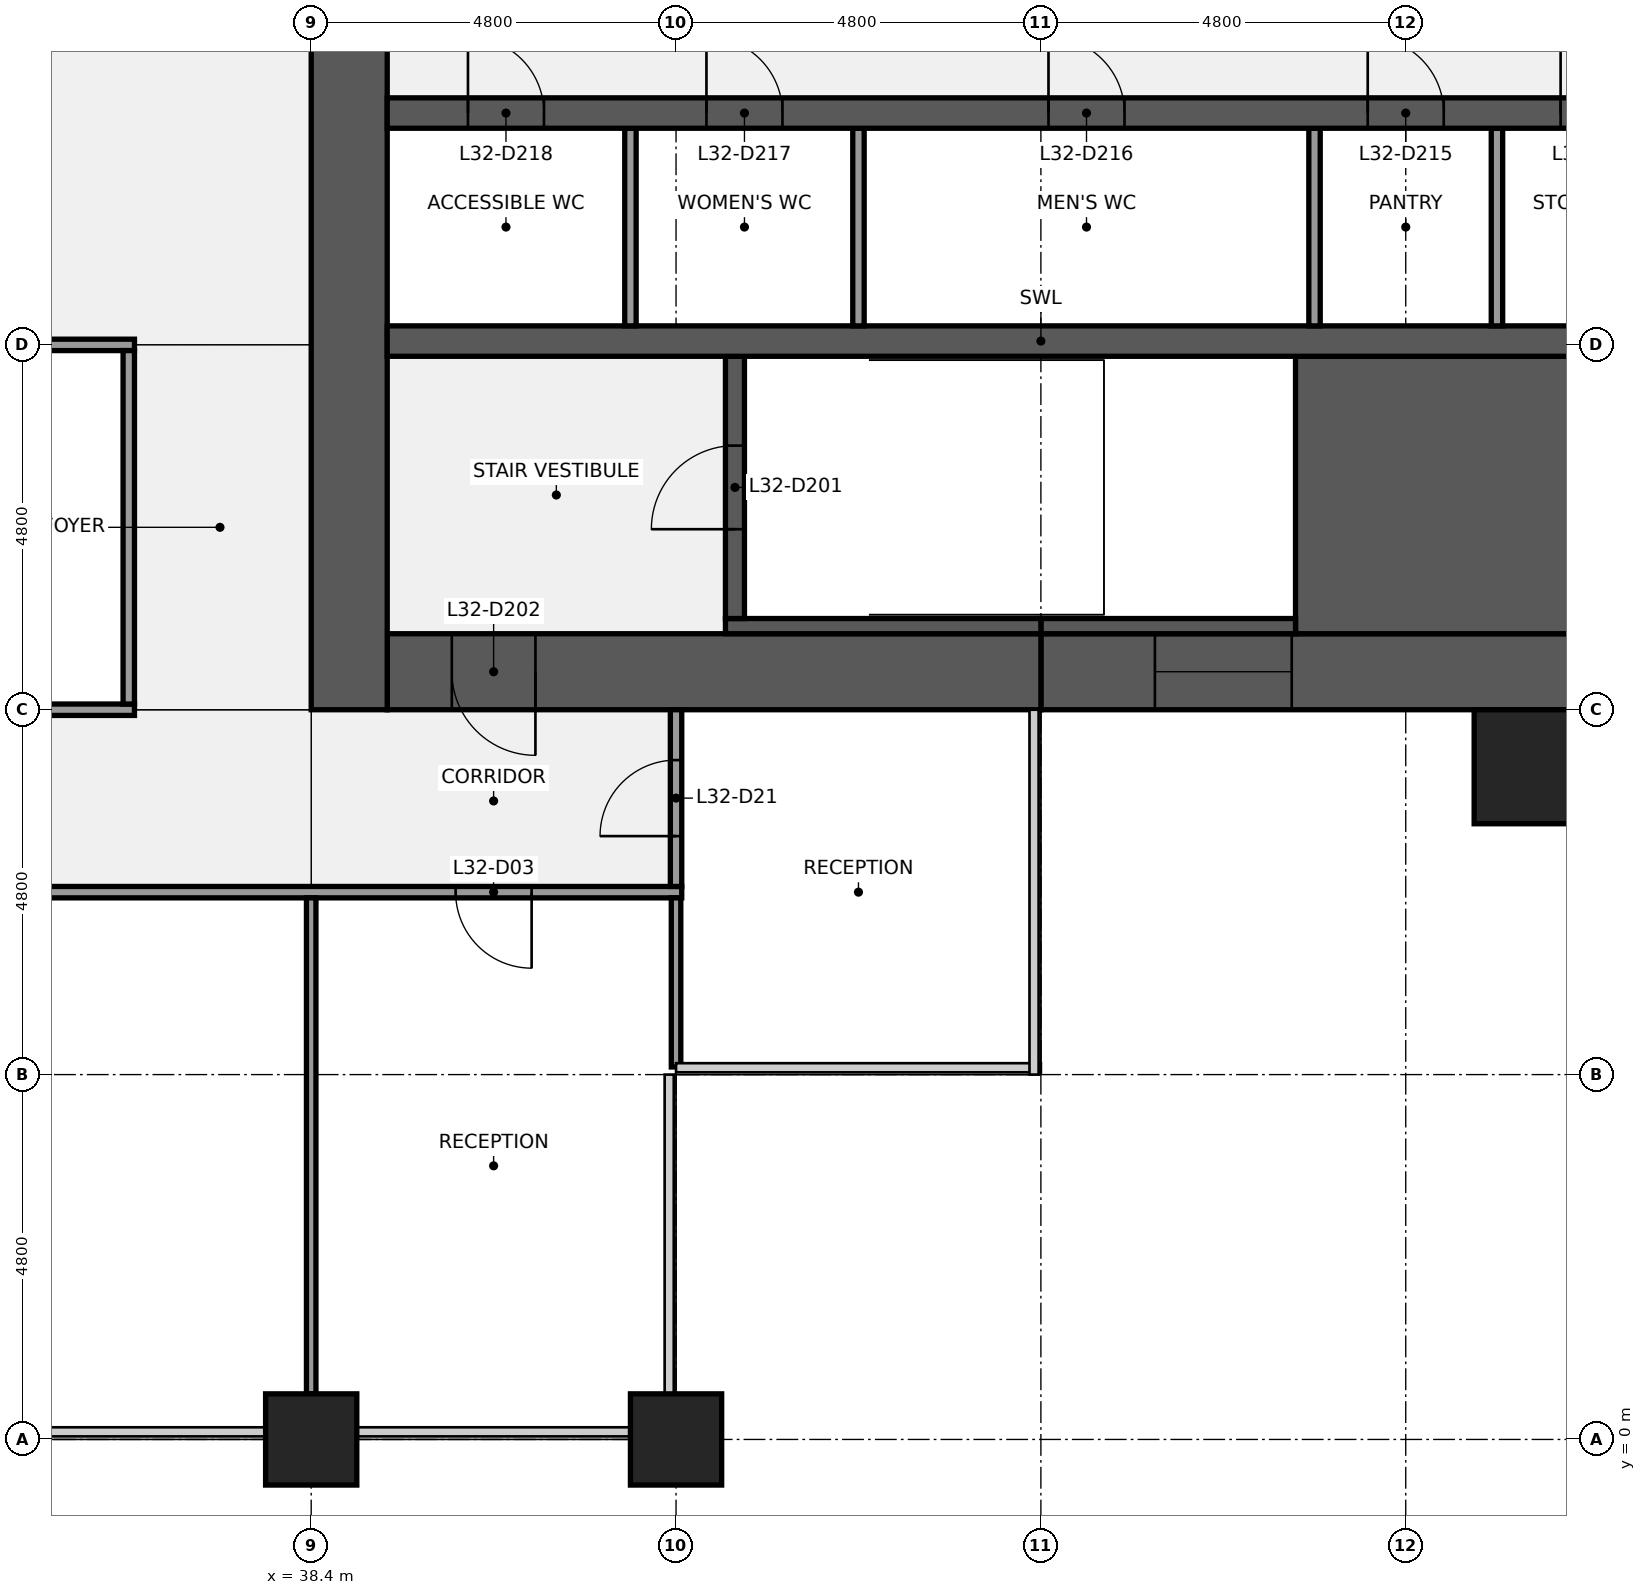
"""IFC4 building model, lengths in metres.
Left out: names, types, materials, properties, quantities, classifications, styles, units other than length and angle.
Written with IfcOpenShell. Run it as: python <this file> out.ifc"""

import sys

from ifc_helpers import new_model, si_unit, direction, frame, frame_2d, origin, origin_2d, place, context, subcontext, project, spatial, rectangle, extrude, element, fill, save


model = new_model("IFC4")
c1 = context("Model", 3, precision=1e-05, world=origin(), true_north=direction((0.0, 1.0)))
c2 = subcontext(c1, "Body", "Model", "MODEL_VIEW")
j1 = project(units=[si_unit("LENGTHUNIT", "METRE"), si_unit("PLANEANGLEUNIT", "RADIAN")], contexts=[c1])
p1 = place(None, origin())
s1 = spatial("IfcSite", under=j1, at=p1, CompositionType="ELEMENT")
p2 = place(p1, origin())
s2 = spatial("IfcBuilding", under=s1, at=p2, CompositionType="ELEMENT")
p3 = place(p2, frame((0.0, 0.0, 148.1)))
s3 = spatial("IfcBuildingStorey", under=s2, at=p3, CompositionType="ELEMENT", Elevation=148.1)
for number, where, z_axis, x_axis in (
    (1, (38.4, 0.0, 0.0), (0.0, 0.0, 1.0), (1.0, 0.0, 0.0)),
    (2, (43.2, 0.0, 0.0), (0.0, 0.0, 1.0), (1.0, 0.0, 0.0)),
):
    element("IfcColumn", number, at=place(p3, frame(where, z_axis=z_axis, x_axis=x_axis)), inside=s3, PredefinedType="COLUMN", context=c2, shape_type="SweptSolid", body=[
        extrude(rectangle(XDim=1.2, YDim=1.2, at=origin_2d()), origin(), (0.0, 0.0, 1.0), 4.0),
    ])
p4 = place(p3, frame((56.6, 10.1, 0.0), z_axis=(0.0, 0.0, 1.0), x_axis=(-1.0, 0.0, 0.0)))
e3 = element("IfcWall", 3, at=p4, inside=s3, PredefinedType="SHEAR", context=c2, shape_type="SweptSolid", body=[
    extrude(rectangle(XDim=8.6, YDim=1.0, at=frame_2d((4.3, 0.0))), origin(), (0.0, 0.0, 1.0), 3.84),
])
p5 = place(p4, frame((5.3, 0.0, 0.9)))
e4 = element("IfcOpeningElement", 4, at=p5, cuts=e3, PredefinedType="OPENING", context=c2, shape_type="SweptSolid", body=[
    extrude(rectangle(XDim=1.8, YDim=1.5, at=frame_2d((0.9, 0.75))), frame((0.0, 0.51, 0.0), z_axis=(0.0, -1.0, 0.0), x_axis=(1.0, 0.0, 0.0)), (0.0, 0.0, 1.0), 1.02),
])
p6 = place(p3, frame((48.0, 10.1, 0.0), z_axis=(0.0, 0.0, 1.0), x_axis=(-1.0, 0.0, 0.0)))
e5 = element("IfcWall", 5, at=p6, inside=s3, PredefinedType="SHEAR", context=c2, shape_type="SweptSolid", body=[
    extrude(rectangle(XDim=8.6, YDim=1.0, at=frame_2d((4.3, 0.0))), origin(), (0.0, 0.0, 1.0), 3.84),
])
p7 = place(p6, frame((6.65, 0.0, 0.0)))
e6 = element("IfcOpeningElement", 6, at=p7, cuts=e5, PredefinedType="OPENING", context=c2, shape_type="SweptSolid", body=[
    extrude(rectangle(XDim=1.1, YDim=2.1, at=frame_2d((0.55, 1.05))), frame((0.0, 0.51, 0.0), z_axis=(0.0, -1.0, 0.0), x_axis=(1.0, 0.0, 0.0)), (0.0, 0.0, 1.0), 1.02),
])
p8 = place(p3, frame((38.9, 9.6, 0.0), z_axis=(0.0, 0.0, 1.0), x_axis=(0.0, 1.0, 0.0)))
e7 = element("IfcWall", 7, at=p8, inside=s3, PredefinedType="SHEAR", context=c2, shape_type="SweptSolid", body=[
    extrude(rectangle(XDim=28.8, YDim=1.0, at=frame_2d((14.4, 0.0))), origin(), (0.0, 0.0, 1.0), 3.84),
])
p9 = place(p8, frame((8.7, 0.0, 0.0)))
e8 = element("IfcOpeningElement", 8, at=p9, cuts=e7, PredefinedType="OPENING", context=c2, shape_type="SweptSolid", body=[
    extrude(rectangle(XDim=1.8, YDim=2.1, at=frame_2d((0.9, 1.05))), frame((0.0, 0.51, 0.0), z_axis=(0.0, -1.0, 0.0), x_axis=(1.0, 0.0, 0.0)), (0.0, 0.0, 1.0), 1.02),
])
p10 = place(p8, frame((18.3, 0.0, 0.0)))
e9 = element("IfcOpeningElement", 9, at=p10, cuts=e7, PredefinedType="OPENING", context=c2, shape_type="SweptSolid", body=[
    extrude(rectangle(XDim=1.8, YDim=2.1, at=frame_2d((0.9, 1.05))), frame((0.0, 0.51, 0.0), z_axis=(0.0, -1.0, 0.0), x_axis=(1.0, 0.0, 0.0)), (0.0, 0.0, 1.0), 1.02),
])
p11 = place(p3, frame((51.35, 12.425, 0.0), z_axis=(0.0, 0.0, 1.0), x_axis=(1.0, 0.0, 0.0)))
e10 = element("IfcWall", 10, at=p11, inside=s3, PredefinedType="SHEAR", context=c2, shape_type="SweptSolid", body=[
    extrude(rectangle(XDim=5.25, YDim=3.65, at=frame_2d((2.625, 0.0))), origin(), (0.0, 0.0, 1.0), 3.84),
])
p12 = place(p3, frame((48.0, 10.7, 0.0), z_axis=(0.0, 0.0, 1.0), x_axis=(1.0, 0.0, 0.0)))
e11 = element("IfcWall", 11, at=p12, inside=s3, PredefinedType="SHEAR", context=c2, shape_type="SweptSolid", body=[
    extrude(rectangle(XDim=3.35, YDim=0.2, at=frame_2d((1.675, 0.0))), origin(), (0.0, 0.0, 1.0), 3.84),
])
p13 = place(p3, frame((43.85, 10.7, 0.0), z_axis=(0.0, 0.0, 1.0), x_axis=(1.0, 0.0, 0.0)))
e12 = element("IfcWall", 12, at=p13, inside=s3, PredefinedType="SHEAR", context=c2, shape_type="SweptSolid", body=[
    extrude(rectangle(XDim=4.15, YDim=0.2, at=frame_2d((2.075, 0.0))), origin(), (0.0, 0.0, 1.0), 3.84),
])
p14 = place(p3, frame((43.975, 10.8, 0.0), z_axis=(0.0, 0.0, 1.0), x_axis=(0.0, 1.0, 0.0)))
e13 = element("IfcWall", 13, at=p14, inside=s3, PredefinedType="SHEAR", context=c2, shape_type="SweptSolid", body=[
    extrude(rectangle(XDim=3.45, YDim=0.25, at=frame_2d((1.725, 0.0))), origin(), (0.0, 0.0, 1.0), 3.84),
])
p15 = place(p14, frame((1.175, 0.0, 0.0)))
e14 = element("IfcOpeningElement", 14, at=p15, cuts=e13, PredefinedType="OPENING", context=c2, shape_type="SweptSolid", body=[
    extrude(rectangle(XDim=1.1, YDim=2.1, at=frame_2d((0.55, 1.05))), frame((0.0, 0.135, 0.0), z_axis=(0.0, -1.0, 0.0), x_axis=(1.0, 0.0, 0.0)), (0.0, 0.0, 1.0), 0.27),
])
p16 = place(p3, frame((39.4, 14.45, 0.0), z_axis=(0.0, 0.0, 1.0), x_axis=(1.0, 0.0, 0.0)))
e15 = element("IfcWall", 15, at=p16, inside=s3, PredefinedType="SHEAR", context=c2, shape_type="SweptSolid", body=[
    extrude(rectangle(XDim=17.2, YDim=0.4, at=frame_2d((8.6, 0.0))), origin(), (0.0, 0.0, 1.0), 3.84),
])
for number, where, z_axis, x_axis in (
    (16, (54.0, 14.65, 0.0), (0.0, 0.0, 1.0), (0.0, 1.0, 0.0)),
    (17, (51.6, 14.65, 0.0), (0.0, 0.0, 1.0), (0.0, 1.0, 0.0)),
    (18, (45.6, 14.65, 0.0), (0.0, 0.0, 1.0), (0.0, 1.0, 0.0)),
    (19, (42.6, 14.65, 0.0), (0.0, 0.0, 1.0), (0.0, 1.0, 0.0)),
):
    element("IfcWall", number, at=place(p3, frame(where, z_axis=z_axis, x_axis=x_axis)), inside=s3, PredefinedType="PARTITIONING", context=c2, shape_type="SweptSolid", body=[
        extrude(rectangle(XDim=2.6, YDim=0.15, at=frame_2d((1.3, 0.0))), origin(), (0.0, 0.0, 1.0), 3.84),
    ])
p17 = place(p3, frame((39.4, 17.45, 0.0), z_axis=(0.0, 0.0, 1.0), x_axis=(1.0, 0.0, 0.0)))
e20 = element("IfcWall", 20, at=p17, inside=s3, PredefinedType="SHEAR", context=c2, shape_type="SweptSolid", body=[
    extrude(rectangle(XDim=17.2, YDim=0.4, at=frame_2d((8.6, 0.0))), origin(), (0.0, 0.0, 1.0), 3.84),
])
p18 = place(p17, frame((15.438, 0.0, 0.0)))
e21 = element("IfcOpeningElement", 21, at=p18, cuts=e20, PredefinedType="OPENING", context=c2, shape_type="SweptSolid", body=[
    extrude(rectangle(XDim=1.0, YDim=2.1, at=frame_2d((0.5, 1.05))), frame((0.0, 0.21, 0.0), z_axis=(0.0, -1.0, 0.0), x_axis=(1.0, 0.0, 0.0)), (0.0, 0.0, 1.0), 0.42),
])
p19 = place(p17, frame((12.9, 0.0, 0.0)))
e22 = element("IfcOpeningElement", 22, at=p19, cuts=e20, PredefinedType="OPENING", context=c2, shape_type="SweptSolid", body=[
    extrude(rectangle(XDim=1.0, YDim=2.1, at=frame_2d((0.5, 1.05))), frame((0.0, 0.21, 0.0), z_axis=(0.0, -1.0, 0.0), x_axis=(1.0, 0.0, 0.0)), (0.0, 0.0, 1.0), 0.42),
])
p20 = place(p17, frame((8.7, 0.0, 0.0)))
e23 = element("IfcOpeningElement", 23, at=p20, cuts=e20, PredefinedType="OPENING", context=c2, shape_type="SweptSolid", body=[
    extrude(rectangle(XDim=1.0, YDim=2.1, at=frame_2d((0.5, 1.05))), frame((0.0, 0.21, 0.0), z_axis=(0.0, -1.0, 0.0), x_axis=(1.0, 0.0, 0.0)), (0.0, 0.0, 1.0), 0.42),
])
p21 = place(p17, frame((4.2, 0.0, 0.0)))
e24 = element("IfcOpeningElement", 24, at=p21, cuts=e20, PredefinedType="OPENING", context=c2, shape_type="SweptSolid", body=[
    extrude(rectangle(XDim=1.0, YDim=2.1, at=frame_2d((0.5, 1.05))), frame((0.0, 0.21, 0.0), z_axis=(0.0, -1.0, 0.0), x_axis=(1.0, 0.0, 0.0)), (0.0, 0.0, 1.0), 0.42),
])
p22 = place(p17, frame((1.062, 0.0, 0.0)))
e25 = element("IfcOpeningElement", 25, at=p22, cuts=e20, PredefinedType="OPENING", context=c2, shape_type="SweptSolid", body=[
    extrude(rectangle(XDim=1.0, YDim=2.1, at=frame_2d((0.5, 1.05))), frame((0.0, 0.21, 0.0), z_axis=(0.0, -1.0, 0.0), x_axis=(1.0, 0.0, 0.0)), (0.0, 0.0, 1.0), 0.42),
])
p23 = place(p3, frame((14.325, 7.2, 0.0), z_axis=(0.0, 0.0, 1.0), x_axis=(1.0, 0.0, 0.0)))
e26 = element("IfcWall", 26, at=p23, inside=s3, PredefinedType="PARTITIONING", context=c2, shape_type="SweptSolid", body=[
    extrude(rectangle(XDim=28.95, YDim=0.15, at=frame_2d((14.475, 0.0))), origin(), (0.0, 0.0, 1.0), 2.849),
])
p24 = place(p23, frame((1.375, 0.0, 0.0)))
e27 = element("IfcOpeningElement", 27, at=p24, cuts=e26, PredefinedType="OPENING", context=c2, shape_type="SweptSolid", body=[
    extrude(rectangle(XDim=1.0, YDim=2.1, at=frame_2d((0.5, 1.05))), frame((0.0, 0.085, 0.0), z_axis=(0.0, -1.0, 0.0), x_axis=(1.0, 0.0, 0.0)), (0.0, 0.0, 1.0), 0.17),
])
p25 = place(p23, frame((13.975, 0.0, 0.0)))
e28 = element("IfcOpeningElement", 28, at=p25, cuts=e26, PredefinedType="OPENING", context=c2, shape_type="SweptSolid", body=[
    extrude(rectangle(XDim=1.0, YDim=2.1, at=frame_2d((0.5, 1.05))), frame((0.0, 0.085, 0.0), z_axis=(0.0, -1.0, 0.0), x_axis=(1.0, 0.0, 0.0)), (0.0, 0.0, 1.0), 0.17),
])
p26 = place(p23, frame((25.975, 0.0, 0.0)))
e29 = element("IfcOpeningElement", 29, at=p26, cuts=e26, PredefinedType="OPENING", context=c2, shape_type="SweptSolid", body=[
    extrude(rectangle(XDim=1.0, YDim=2.1, at=frame_2d((0.5, 1.05))), frame((0.0, 0.085, 0.0), z_axis=(0.0, -1.0, 0.0), x_axis=(1.0, 0.0, 0.0)), (0.0, 0.0, 1.0), 0.17),
])
p27 = place(p3, frame((21.525, 9.6, 0.0), z_axis=(0.0, 0.0, 1.0), x_axis=(1.0, 0.0, 0.0)))
e30 = element("IfcWall", 30, at=p27, inside=s3, PredefinedType="PARTITIONING", context=c2, shape_type="SweptSolid", body=[
    extrude(rectangle(XDim=14.55, YDim=0.15, at=frame_2d((7.275, 0.0))), origin(), (0.0, 0.0, 1.0), 2.849),
])
p28 = place(p27, frame((2.575, 0.0, 0.0)))
e31 = element("IfcOpeningElement", 31, at=p28, cuts=e30, PredefinedType="OPENING", context=c2, shape_type="SweptSolid", body=[
    extrude(rectangle(XDim=1.0, YDim=2.1, at=frame_2d((0.5, 1.05))), frame((0.0, 0.085, 0.0), z_axis=(0.0, -1.0, 0.0), x_axis=(1.0, 0.0, 0.0)), (0.0, 0.0, 1.0), 0.17),
])
p29 = place(p27, frame((9.775, 0.0, 0.0)))
e32 = element("IfcOpeningElement", 32, at=p29, cuts=e30, PredefinedType="OPENING", context=c2, shape_type="SweptSolid", body=[
    extrude(rectangle(XDim=1.0, YDim=2.1, at=frame_2d((0.5, 1.05))), frame((0.0, 0.085, 0.0), z_axis=(0.0, -1.0, 0.0), x_axis=(1.0, 0.0, 0.0)), (0.0, 0.0, 1.0), 0.17),
])
p30 = place(p3, frame((33.675, 14.4, 0.0), z_axis=(0.0, 0.0, 1.0), x_axis=(1.0, 0.0, 0.0)))
e33 = element("IfcWall", 33, at=p30, inside=s3, PredefinedType="PARTITIONING", context=c2, shape_type="SweptSolid", body=[
    extrude(rectangle(XDim=2.4, YDim=0.15, at=frame_2d((1.2, 0.0))), origin(), (0.0, 0.0, 1.0), 2.849),
])
p31 = place(p3, frame((36.0, 9.675, 0.0), z_axis=(0.0, 0.0, 1.0), x_axis=(0.0, 1.0, 0.0)))
e34 = element("IfcWall", 34, at=p31, inside=s3, PredefinedType="PARTITIONING", context=c2, shape_type="SweptSolid", body=[
    extrude(rectangle(XDim=4.65, YDim=0.15, at=frame_2d((2.325, 0.0))), origin(), (0.0, 0.0, 1.0), 2.849),
])
p32 = place(p3, frame((38.4, 0.6, 0.0), z_axis=(0.0, 0.0, 1.0), x_axis=(0.0, 1.0, 0.0)))
e35 = element("IfcWall", 35, at=p32, inside=s3, PredefinedType="PARTITIONING", context=c2, shape_type="SweptSolid", body=[
    extrude(rectangle(XDim=6.525, YDim=0.125, at=frame_2d((3.262, 0.0))), origin(), (0.0, 0.0, 1.0), 2.849),
])
p33 = place(p3, frame((43.2, 4.9, 0.0), z_axis=(0.0, 0.0, 1.0), x_axis=(0.0, 1.0, 0.0)))
e36 = element("IfcWall", 36, at=p33, inside=s3, PredefinedType="PARTITIONING", context=c2, shape_type="SweptSolid", body=[
    extrude(rectangle(XDim=2.225, YDim=0.125, at=frame_2d((1.113, 0.0))), origin(), (0.0, 0.0, 1.0), 2.849),
])
p34 = place(p3, frame((43.2, 7.275, 0.0), z_axis=(0.0, 0.0, 1.0), x_axis=(0.0, 1.0, 0.0)))
e37 = element("IfcWall", 37, at=p34, inside=s3, PredefinedType="PARTITIONING", context=c2, shape_type="SweptSolid", body=[
    extrude(rectangle(XDim=2.325, YDim=0.15, at=frame_2d((1.163, 0.0))), origin(), (0.0, 0.0, 1.0), 2.849),
])
p35 = place(p34, frame((0.663, 0.0, 0.0)))
e38 = element("IfcOpeningElement", 38, at=p35, cuts=e37, PredefinedType="OPENING", context=c2, shape_type="SweptSolid", body=[
    extrude(rectangle(XDim=1.0, YDim=2.1, at=frame_2d((0.5, 1.05))), frame((0.0, 0.085, 0.0), z_axis=(0.0, -1.0, 0.0), x_axis=(1.0, 0.0, 0.0)), (0.0, 0.0, 1.0), 0.17),
])
p36 = place(p3, frame((55.2, 8.85, 0.0), z_axis=(0.0, 0.0, 1.0), x_axis=(1.0, 0.0, 0.0)))
e39 = element("IfcColumn", 39, at=p36, inside=s3, PredefinedType="PILASTER", context=c2, shape_type="SweptSolid", body=[
    extrude(rectangle(XDim=3.0, YDim=1.5, at=origin_2d()), origin(), (0.0, 0.0, 1.0), 4.0),
])
for number, where, z_axis, x_axis in (
    (40, (38.4, -1.05, 0.0), (0.0, 0.0, 1.0), (1.0, 0.0, 0.0)),
    (41, (43.2, -1.05, 0.0), (0.0, 0.0, 1.0), (1.0, 0.0, 0.0)),
):
    element("IfcColumn", number, at=place(p3, frame(where, z_axis=z_axis, x_axis=x_axis)), inside=s3, PredefinedType="PILASTER", context=c2, shape_type="SweptSolid", body=[
        extrude(rectangle(XDim=3.6, YDim=0.9, at=origin_2d()), origin(), (0.0, 0.0, 1.0), 4.0),
    ])
p37 = place(p15, origin())
e42 = element("IfcDoor", 42, at=p37, inside=s3, OperationType="SINGLE_SWING_LEFT", PredefinedType="DOOR", context=c2, shape_type="SweptSolid", body=[
    extrude(rectangle(XDim=1.1, YDim=2.1, at=frame_2d((0.55, 1.05))), frame((0.0, 0.025, 0.0), z_axis=(0.0, -1.0, 0.0), x_axis=(1.0, 0.0, 0.0)), (0.0, 0.0, 1.0), 0.05),
])
fill(e14, e42)
p38 = place(p7, origin())
e43 = element("IfcDoor", 43, at=p38, inside=s3, OperationType="SINGLE_SWING_LEFT", PredefinedType="DOOR", context=c2, shape_type="SweptSolid", body=[
    extrude(rectangle(XDim=1.1, YDim=2.1, at=frame_2d((0.55, 1.05))), frame((0.0, 0.025, 0.0), z_axis=(0.0, -1.0, 0.0), x_axis=(1.0, 0.0, 0.0)), (0.0, 0.0, 1.0), 0.05),
])
fill(e6, e43)
p39 = place(p18, origin())
e44 = element("IfcDoor", 44, at=p39, inside=s3, OperationType="SINGLE_SWING_LEFT", PredefinedType="DOOR", context=c2, shape_type="SweptSolid", body=[
    extrude(rectangle(XDim=1.0, YDim=2.1, at=frame_2d((0.5, 1.05))), frame((0.0, 0.025, 0.0), z_axis=(0.0, -1.0, 0.0), x_axis=(1.0, 0.0, 0.0)), (0.0, 0.0, 1.0), 0.05),
])
fill(e21, e44)
p40 = place(p19, origin())
e45 = element("IfcDoor", 45, at=p40, inside=s3, OperationType="SINGLE_SWING_LEFT", PredefinedType="DOOR", context=c2, shape_type="SweptSolid", body=[
    extrude(rectangle(XDim=1.0, YDim=2.1, at=frame_2d((0.5, 1.05))), frame((0.0, 0.025, 0.0), z_axis=(0.0, -1.0, 0.0), x_axis=(1.0, 0.0, 0.0)), (0.0, 0.0, 1.0), 0.05),
])
fill(e22, e45)
p41 = place(p20, origin())
e46 = element("IfcDoor", 46, at=p41, inside=s3, OperationType="SINGLE_SWING_LEFT", PredefinedType="DOOR", context=c2, shape_type="SweptSolid", body=[
    extrude(rectangle(XDim=1.0, YDim=2.1, at=frame_2d((0.5, 1.05))), frame((0.0, 0.025, 0.0), z_axis=(0.0, -1.0, 0.0), x_axis=(1.0, 0.0, 0.0)), (0.0, 0.0, 1.0), 0.05),
])
fill(e23, e46)
p42 = place(p21, origin())
e47 = element("IfcDoor", 47, at=p42, inside=s3, OperationType="SINGLE_SWING_LEFT", PredefinedType="DOOR", context=c2, shape_type="SweptSolid", body=[
    extrude(rectangle(XDim=1.0, YDim=2.1, at=frame_2d((0.5, 1.05))), frame((0.0, 0.025, 0.0), z_axis=(0.0, -1.0, 0.0), x_axis=(1.0, 0.0, 0.0)), (0.0, 0.0, 1.0), 0.05),
])
fill(e24, e47)
p43 = place(p22, origin())
e48 = element("IfcDoor", 48, at=p43, inside=s3, OperationType="SINGLE_SWING_LEFT", PredefinedType="DOOR", context=c2, shape_type="SweptSolid", body=[
    extrude(rectangle(XDim=1.0, YDim=2.1, at=frame_2d((0.5, 1.05))), frame((0.0, 0.025, 0.0), z_axis=(0.0, -1.0, 0.0), x_axis=(1.0, 0.0, 0.0)), (0.0, 0.0, 1.0), 0.05),
])
fill(e25, e48)
p44 = place(p5, origin())
e49 = element("IfcWindow", 49, at=p44, inside=s3, PartitioningType="SINGLE_PANEL", PredefinedType="WINDOW", context=c2, shape_type="SweptSolid", body=[
    extrude(rectangle(XDim=1.8, YDim=1.5, at=frame_2d((0.9, 0.75))), frame((0.0, 0.03, 0.0), z_axis=(0.0, -1.0, 0.0), x_axis=(1.0, 0.0, 0.0)), (0.0, 0.0, 1.0), 0.06),
])
fill(e4, e49)
p45 = place(p26, origin())
e50 = element("IfcDoor", 50, at=p45, inside=s3, OperationType="SINGLE_SWING_RIGHT", PredefinedType="DOOR", context=c2, shape_type="SweptSolid", body=[
    extrude(rectangle(XDim=1.0, YDim=2.1, at=frame_2d((0.5, 1.05))), frame((0.0, 0.025, 0.0), z_axis=(0.0, -1.0, 0.0), x_axis=(1.0, 0.0, 0.0)), (0.0, 0.0, 1.0), 0.05),
])
fill(e29, e50)
p46 = place(p35, origin())
e51 = element("IfcDoor", 51, at=p46, inside=s3, OperationType="SINGLE_SWING_LEFT", PredefinedType="DOOR", context=c2, shape_type="SweptSolid", body=[
    extrude(rectangle(XDim=1.0, YDim=2.1, at=frame_2d((0.5, 1.05))), frame((0.0, 0.025, 0.0), z_axis=(0.0, -1.0, 0.0), x_axis=(1.0, 0.0, 0.0)), (0.0, 0.0, 1.0), 0.05),
])
fill(e38, e51)
save(model, sys.argv[1])
